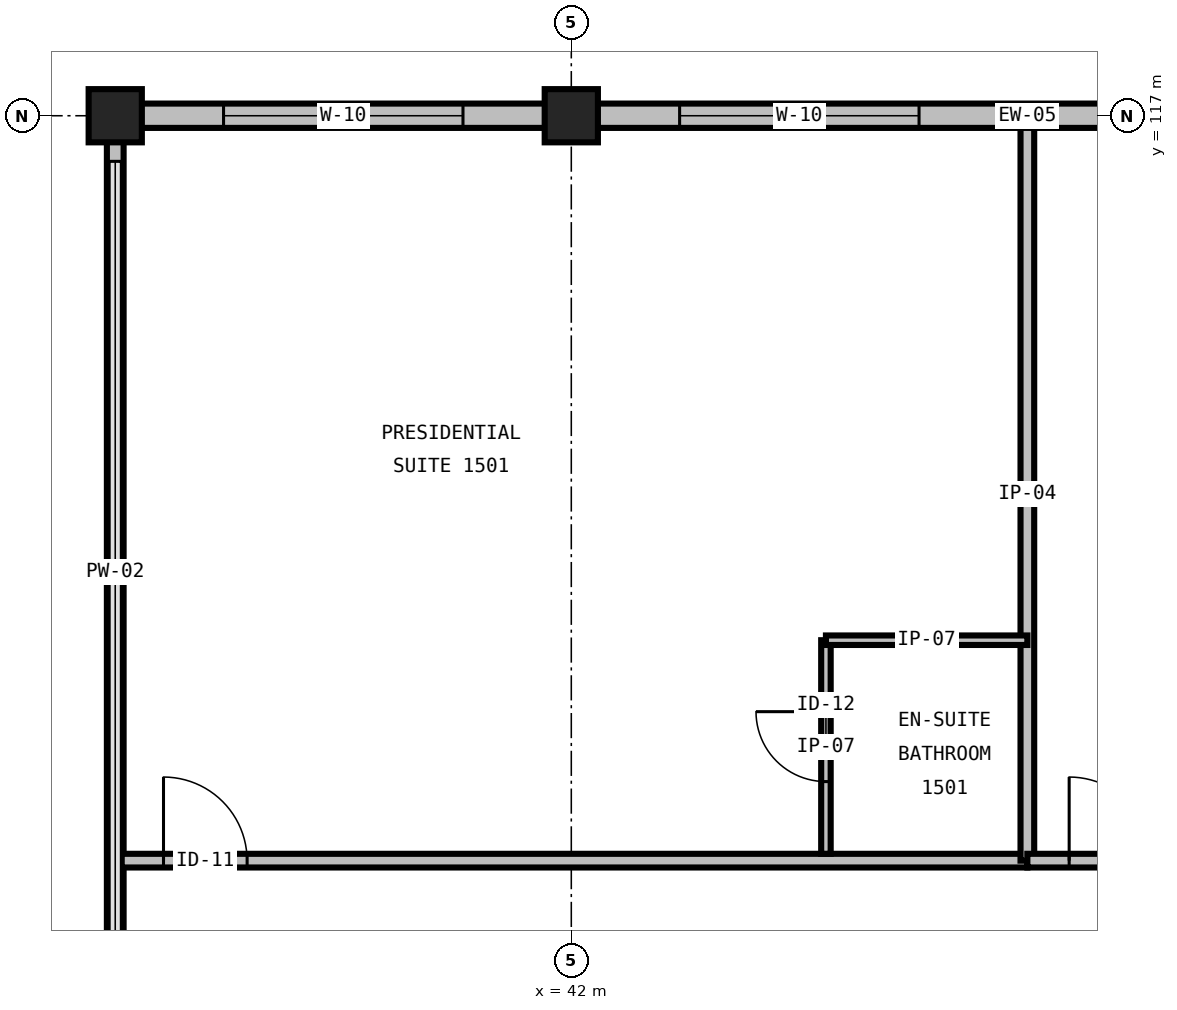
"""IFC4 building model, lengths in metres.
Left out: names, types, materials, properties, quantities, classifications, styles, units other than length and angle.
Written with IfcOpenShell. Run it as: python <this file> out.ifc"""

import sys

from ifc_helpers import new_model, si_unit, direction, frame, frame_2d, origin, origin_2d, place, context, subcontext, project, spatial, rectangle, extrude, element, fill, save


model = new_model("IFC4")
c1 = context("Model", 3, precision=1e-05, world=origin(), true_north=direction((0.0, 1.0)))
c2 = subcontext(c1, "Body", "Model", "MODEL_VIEW")
j1 = project(units=[si_unit("LENGTHUNIT", "METRE"), si_unit("PLANEANGLEUNIT", "RADIAN")], contexts=[c1])
p1 = place(None, origin())
s1 = spatial("IfcSite", under=j1, at=p1, CompositionType="ELEMENT")
p2 = place(p1, origin())
s2 = spatial("IfcBuilding", under=s1, at=p2, CompositionType="ELEMENT")
p3 = place(p2, frame((0.0, 0.0, 63.6)))
s3 = spatial("IfcBuildingStorey", under=s2, at=p3, CompositionType="ELEMENT", Elevation=63.6)
for number, where, z_axis, x_axis in (
    (1, (36.0, 117.0, 0.0), (0.0, 0.0, 1.0), (1.0, 0.0, 0.0)),
    (2, (42.0, 117.0, 0.0), (0.0, 0.0, 1.0), (1.0, 0.0, 0.0)),
):
    element("IfcColumn", number, at=place(p3, frame(where, z_axis=z_axis, x_axis=x_axis)), inside=s3, PredefinedType="COLUMN", context=c2, shape_type="SweptSolid", body=[
        extrude(rectangle(XDim=0.7, YDim=0.7, at=origin_2d()), origin(), (0.0, 0.0, 1.0), 3.6),
    ])
p4 = place(p3, frame((42.0, 117.0, 0.0), z_axis=(0.0, 0.0, 1.0), x_axis=(-1.0, 0.0, 0.0)))
e3 = element("IfcWall", 3, at=p4, inside=s3, PredefinedType="STANDARD", context=c2, shape_type="SweptSolid", body=[
    extrude(rectangle(XDim=6.0, YDim=0.32, at=frame_2d((3.0, 0.0))), origin(), (0.0, 0.0, 1.0), 2.536),
])
p5 = place(p4, frame((1.425, 0.0, 0.65)))
e4 = element("IfcOpeningElement", 4, at=p5, cuts=e3, PredefinedType="OPENING", context=c2, shape_type="SweptSolid", body=[
    extrude(rectangle(XDim=3.15, YDim=1.75, at=frame_2d((1.575, 0.875))), frame((0.0, 0.175, 0.0), z_axis=(0.0, -1.0, 0.0), x_axis=(1.0, 0.0, 0.0)), (0.0, 0.0, 1.0), 0.35),
])
p6 = place(p3, frame((54.0, 117.0, 0.0), z_axis=(0.0, 0.0, 1.0), x_axis=(-1.0, 0.0, 0.0)))
e5 = element("IfcWall", 5, at=p6, inside=s3, PredefinedType="STANDARD", context=c2, shape_type="SweptSolid", body=[
    extrude(rectangle(XDim=12.0, YDim=0.32, at=frame_2d((6.0, 0.0))), origin(), (0.0, 0.0, 1.0), 2.536),
])
p7 = place(p6, frame((1.425, 0.0, 0.65)))
e6 = element("IfcOpeningElement", 6, at=p7, cuts=e5, PredefinedType="OPENING", context=c2, shape_type="SweptSolid", body=[
    extrude(rectangle(XDim=3.15, YDim=1.75, at=frame_2d((1.575, 0.875))), frame((0.0, 0.175, 0.0), z_axis=(0.0, -1.0, 0.0), x_axis=(1.0, 0.0, 0.0)), (0.0, 0.0, 1.0), 0.35),
])
p8 = place(p6, frame((7.425, 0.0, 0.65)))
e7 = element("IfcOpeningElement", 7, at=p8, cuts=e5, PredefinedType="OPENING", context=c2, shape_type="SweptSolid", body=[
    extrude(rectangle(XDim=3.15, YDim=1.75, at=frame_2d((1.575, 0.875))), frame((0.0, 0.175, 0.0), z_axis=(0.0, -1.0, 0.0), x_axis=(1.0, 0.0, 0.0)), (0.0, 0.0, 1.0), 0.35),
])
p9 = place(p3, frame((36.0, 117.0, 0.0), z_axis=(0.0, 0.0, 1.0), x_axis=(0.0, -1.0, 0.0)))
e8 = element("IfcWall", 8, at=p9, inside=s3, PredefinedType="PARAPET", context=c2, shape_type="SweptSolid", body=[
    extrude(rectangle(XDim=12.0, YDim=0.22, at=frame_2d((6.0, 0.0))), origin(), (0.0, 0.0, 1.0), 0.2),
])
p10 = place(p3, frame((36.085, 107.2, 0.0), z_axis=(0.0, 0.0, 1.0), x_axis=(1.0, 0.0, 0.0)))
e9 = element("IfcWall", 9, at=p10, inside=s3, PredefinedType="PARTITIONING", context=c2, shape_type="SweptSolid", body=[
    extrude(rectangle(XDim=11.915, YDim=0.18, at=frame_2d((5.957, 0.0))), origin(), (0.0, 0.0, 1.0), 3.29),
])
p11 = place(p10, frame((0.55, 0.0, 0.0)))
e10 = element("IfcOpeningElement", 10, at=p11, cuts=e9, PredefinedType="OPENING", context=c2, shape_type="SweptSolid", body=[
    extrude(rectangle(XDim=1.1, YDim=2.2, at=frame_2d((0.55, 1.1))), frame((0.0, 0.105, 0.0), z_axis=(0.0, -1.0, 0.0), x_axis=(1.0, 0.0, 0.0)), (0.0, 0.0, 1.0), 0.21),
])
p12 = place(p3, frame((48.0, 107.2, 0.0), z_axis=(0.0, 0.0, 1.0), x_axis=(0.0, 1.0, 0.0)))
e11 = element("IfcWall", 11, at=p12, inside=s3, PredefinedType="PARTITIONING", context=c2, shape_type="SweptSolid", body=[
    extrude(rectangle(XDim=9.64, YDim=0.18, at=frame_2d((4.82, 0.0))), origin(), (0.0, 0.0, 1.0), 3.29),
])
p13 = place(p3, frame((45.35, 107.29, 0.0), z_axis=(0.0, 0.0, 1.0), x_axis=(0.0, 1.0, 0.0)))
e12 = element("IfcWall", 12, at=p13, inside=s3, PredefinedType="PARTITIONING", context=c2, shape_type="SweptSolid", body=[
    extrude(rectangle(XDim=2.81, YDim=0.125, at=frame_2d((1.405, 0.0))), origin(), (0.0, 0.0, 1.0), 3.29),
])
p14 = place(p13, frame((0.95, 0.0, 0.0)))
e13 = element("IfcOpeningElement", 13, at=p14, cuts=e12, PredefinedType="OPENING", context=c2, shape_type="SweptSolid", body=[
    extrude(rectangle(XDim=0.92, YDim=2.1, at=frame_2d((0.46, 1.05))), frame((0.0, 0.077, 0.0), z_axis=(0.0, -1.0, 0.0), x_axis=(1.0, 0.0, 0.0)), (0.0, 0.0, 1.0), 0.155),
])
p15 = place(p3, frame((45.35, 110.1, 0.0), z_axis=(0.0, 0.0, 1.0), x_axis=(1.0, 0.0, 0.0)))
e14 = element("IfcWall", 14, at=p15, inside=s3, PredefinedType="PARTITIONING", context=c2, shape_type="SweptSolid", body=[
    extrude(rectangle(XDim=2.65, YDim=0.125, at=frame_2d((1.325, 0.0))), origin(), (0.0, 0.0, 1.0), 3.29),
])
p16 = place(p3, frame((48.0, 107.2, 0.0), z_axis=(0.0, 0.0, 1.0), x_axis=(1.0, 0.0, 0.0)))
e15 = element("IfcWall", 15, at=p16, inside=s3, PredefinedType="PARTITIONING", context=c2, shape_type="SweptSolid", body=[
    extrude(rectangle(XDim=12.0, YDim=0.18, at=frame_2d((6.0, 0.0))), origin(), (0.0, 0.0, 1.0), 3.29),
])
p17 = place(p16, frame((0.55, 0.0, 0.0)))
e16 = element("IfcOpeningElement", 16, at=p17, cuts=e15, PredefinedType="OPENING", context=c2, shape_type="SweptSolid", body=[
    extrude(rectangle(XDim=1.1, YDim=2.2, at=frame_2d((0.55, 1.1))), frame((0.0, 0.105, 0.0), z_axis=(0.0, -1.0, 0.0), x_axis=(1.0, 0.0, 0.0)), (0.0, 0.0, 1.0), 0.21),
])
p18 = place(p5, origin())
e17 = element("IfcWindow", 17, at=p18, inside=s3, PartitioningType="TRIPLE_PANEL_VERTICAL", PredefinedType="WINDOW", context=c2, shape_type="SweptSolid", body=[
    extrude(rectangle(XDim=3.15, YDim=1.75, at=frame_2d((1.575, 0.875))), frame((0.0, 0.03, 0.0), z_axis=(0.0, -1.0, 0.0), x_axis=(1.0, 0.0, 0.0)), (0.0, 0.0, 1.0), 0.06),
])
fill(e4, e17)
p19 = place(p8, origin())
e18 = element("IfcWindow", 18, at=p19, inside=s3, PartitioningType="TRIPLE_PANEL_VERTICAL", PredefinedType="WINDOW", context=c2, shape_type="SweptSolid", body=[
    extrude(rectangle(XDim=3.15, YDim=1.75, at=frame_2d((1.575, 0.875))), frame((0.0, 0.03, 0.0), z_axis=(0.0, -1.0, 0.0), x_axis=(1.0, 0.0, 0.0)), (0.0, 0.0, 1.0), 0.06),
])
fill(e7, e18)
p20 = place(p11, origin())
e19 = element("IfcDoor", 19, at=p20, inside=s3, OperationType="SINGLE_SWING_LEFT", PredefinedType="DOOR", context=c2, shape_type="SweptSolid", body=[
    extrude(rectangle(XDim=1.1, YDim=2.2, at=frame_2d((0.55, 1.1))), frame((0.0, 0.025, 0.0), z_axis=(0.0, -1.0, 0.0), x_axis=(1.0, 0.0, 0.0)), (0.0, 0.0, 1.0), 0.05),
])
fill(e10, e19)
p21 = place(p14, origin())
e20 = element("IfcDoor", 20, at=p21, inside=s3, OperationType="SINGLE_SWING_RIGHT", PredefinedType="DOOR", context=c2, shape_type="SweptSolid", body=[
    extrude(rectangle(XDim=0.92, YDim=2.1, at=frame_2d((0.46, 1.05))), frame((0.0, 0.025, 0.0), z_axis=(0.0, -1.0, 0.0), x_axis=(1.0, 0.0, 0.0)), (0.0, 0.0, 1.0), 0.05),
])
fill(e13, e20)
p22 = place(p17, origin())
e21 = element("IfcDoor", 21, at=p22, inside=s3, OperationType="SINGLE_SWING_LEFT", PredefinedType="DOOR", context=c2, shape_type="SweptSolid", body=[
    extrude(rectangle(XDim=1.1, YDim=2.2, at=frame_2d((0.55, 1.1))), frame((0.0, 0.025, 0.0), z_axis=(0.0, -1.0, 0.0), x_axis=(1.0, 0.0, 0.0)), (0.0, 0.0, 1.0), 0.05),
])
fill(e16, e21)
save(model, sys.argv[1])
